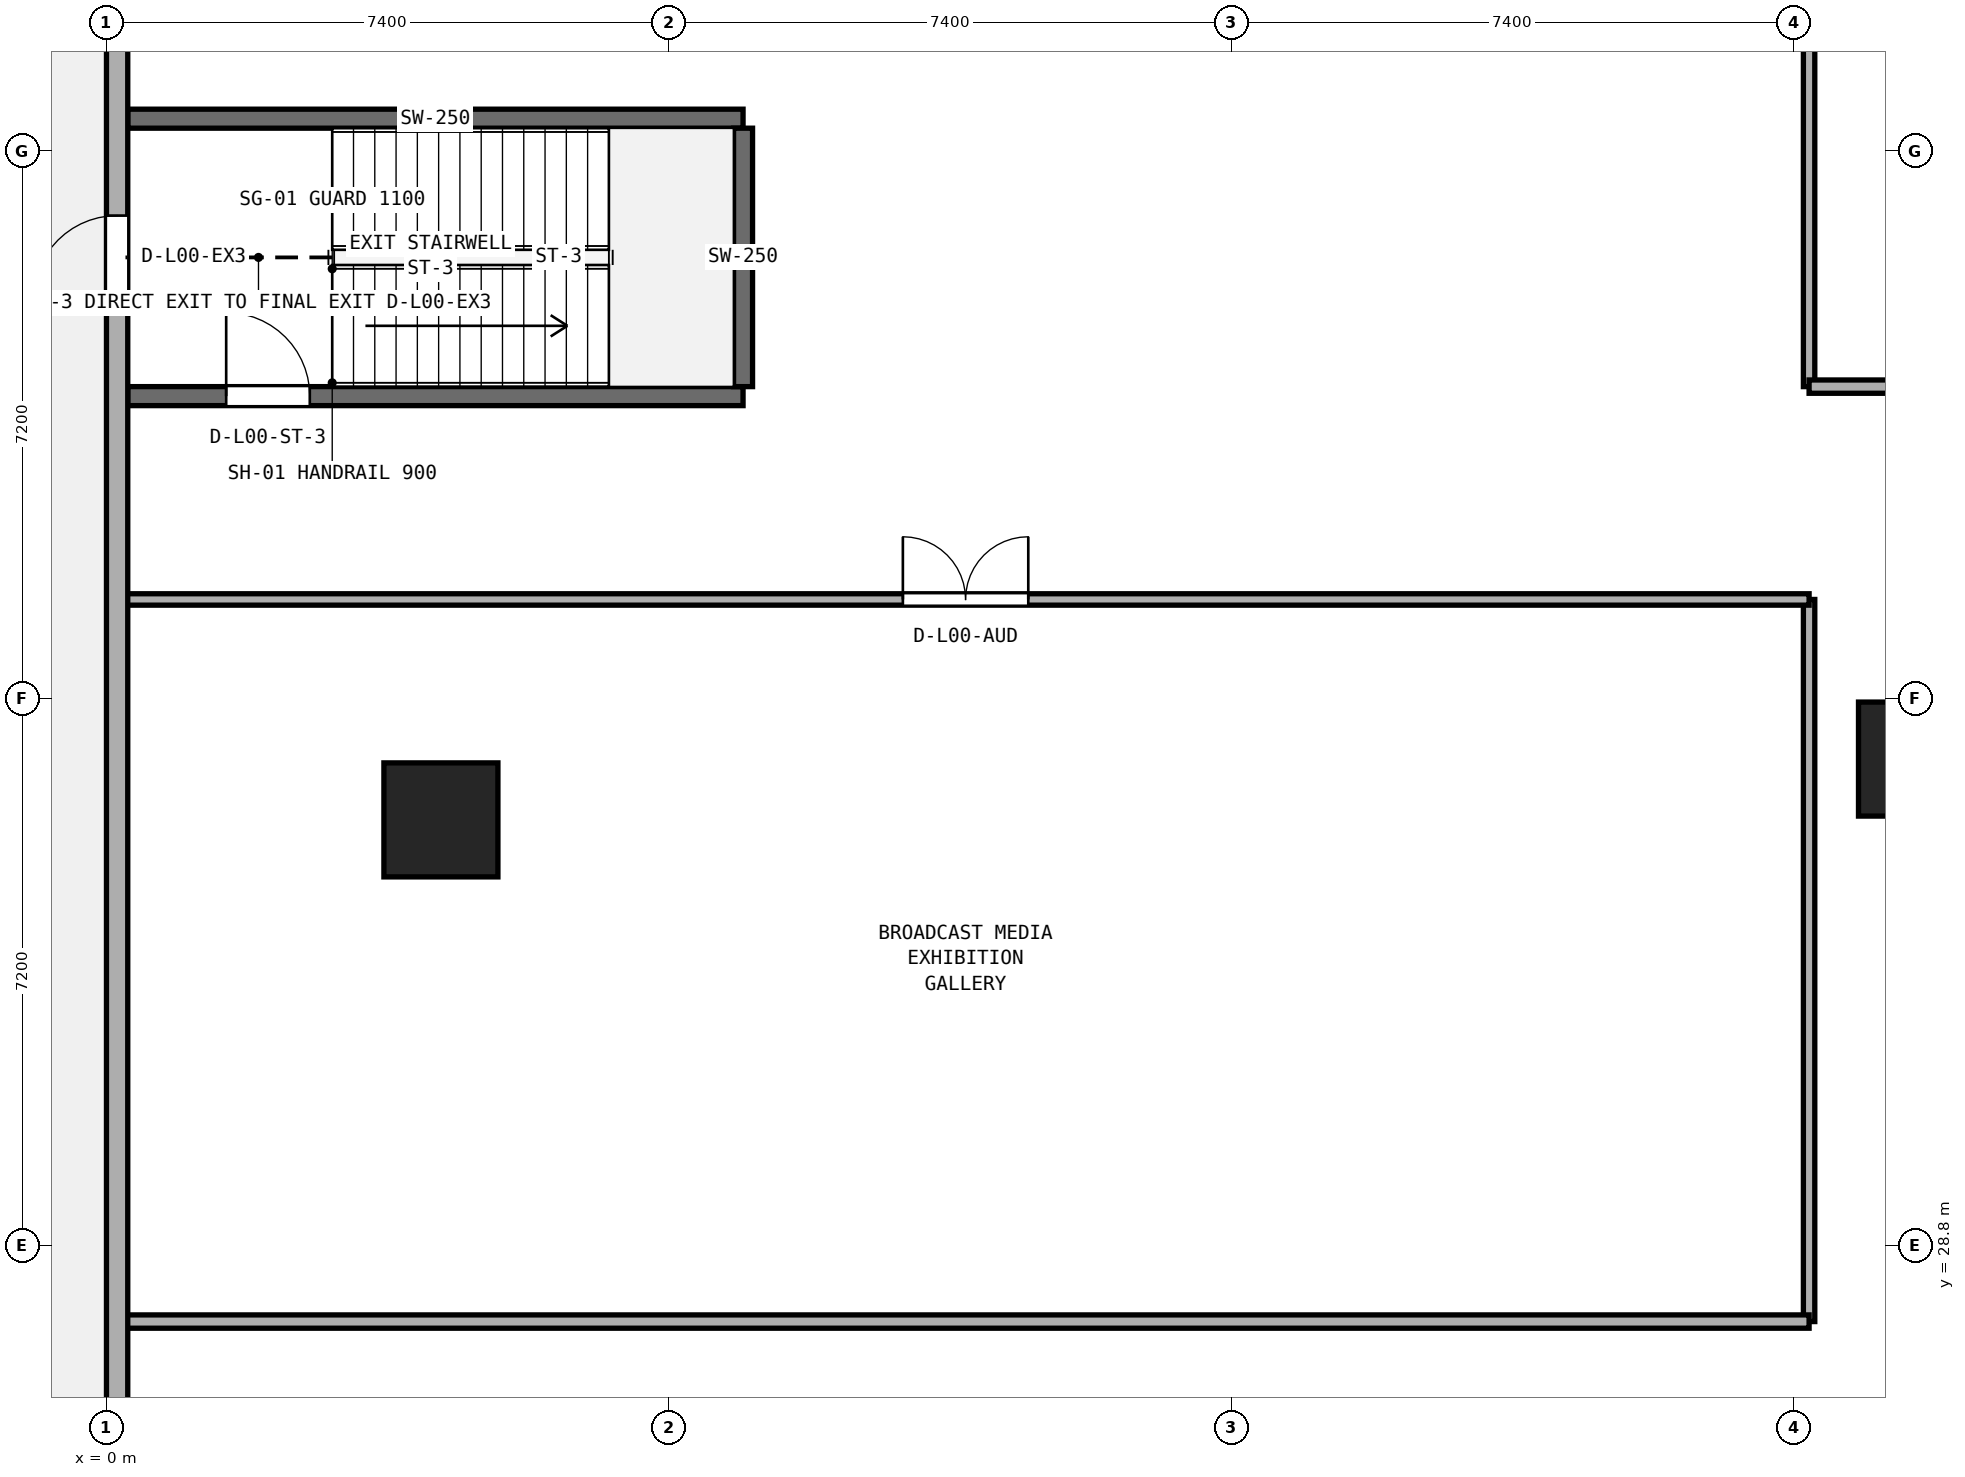
"""IFC4 building model, lengths in metres.
Left out: names, types, materials, properties, quantities, classifications, styles, units other than length and angle.
Written with IfcOpenShell. Run it as: python <this file> out.ifc"""

import sys

from ifc_helpers import new_model, si_unit, direction, frame, frame_2d, origin, origin_2d, place, context, subcontext, project, spatial, rectangle, extrude, element, fill, save


model = new_model("IFC4")
c1 = context("Model", 3, precision=1e-05, world=origin(), true_north=direction((0.0, 1.0)))
c2 = subcontext(c1, "Body", "Model", "MODEL_VIEW")
j1 = project(units=[si_unit("LENGTHUNIT", "METRE"), si_unit("PLANEANGLEUNIT", "RADIAN")], contexts=[c1])
p1 = place(None, origin())
s1 = spatial("IfcSite", under=j1, at=p1, CompositionType="ELEMENT")
p2 = place(p1, origin())
s2 = spatial("IfcBuilding", under=s1, at=p2, CompositionType="ELEMENT")
p3 = place(p2, origin())
s3 = spatial("IfcBuildingStorey", under=s2, at=p3, CompositionType="ELEMENT", Elevation=0.0)
for number, where, z_axis, x_axis in (
    (1, (4.4, 34.4, 0.0), (0.0, 0.0, 1.0), (1.0, 0.0, 0.0)),
    (2, (23.8, 35.2, 0.0), (0.0, 0.0, 1.0), (1.0, 0.0, 0.0)),
):
    element("IfcColumn", number, at=place(p3, frame(where, z_axis=z_axis, x_axis=x_axis)), inside=s3, PredefinedType="COLUMN", context=c2, shape_type="SweptSolid", body=[
        extrude(rectangle(XDim=1.5, YDim=1.5, at=origin_2d()), origin(), (0.0, 0.0, 1.0), 5.0),
    ])
p4 = place(p3, frame((0.28, 39.975, 0.0), z_axis=(0.0, 0.0, 1.0), x_axis=(1.0, 0.0, 0.0)))
e3 = element("IfcWall", 3, at=p4, inside=s3, PredefinedType="SHEAR", context=c2, shape_type="SweptSolid", body=[
    extrude(rectangle(XDim=8.095, YDim=0.25, at=frame_2d((4.047, 0.0))), origin(), (0.0, 0.0, 1.0), 4.66),
])
p5 = place(p4, frame((1.295, 0.0, 0.0)))
e4 = element("IfcOpeningElement", 4, at=p5, cuts=e3, PredefinedType="OPENING", context=c2, shape_type="SweptSolid", body=[
    extrude(rectangle(XDim=1.1, YDim=2.15, at=frame_2d((0.55, 1.075))), frame((0.0, 0.135, 0.0), z_axis=(0.0, -1.0, 0.0), x_axis=(1.0, 0.0, 0.0)), (0.0, 0.0, 1.0), 0.27),
])
p6 = place(p3, frame((0.28, 43.625, 0.0), z_axis=(0.0, 0.0, 1.0), x_axis=(1.0, 0.0, 0.0)))
e5 = element("IfcWall", 5, at=p6, inside=s3, PredefinedType="SHEAR", context=c2, shape_type="SweptSolid", body=[
    extrude(rectangle(XDim=8.095, YDim=0.25, at=frame_2d((4.047, 0.0))), origin(), (0.0, 0.0, 1.0), 4.66),
])
p7 = place(p3, frame((8.375, 40.1, 0.0), z_axis=(0.0, 0.0, 1.0), x_axis=(0.0, 1.0, 0.0)))
e6 = element("IfcWall", 6, at=p7, inside=s3, PredefinedType="SHEAR", context=c2, shape_type="SweptSolid", body=[
    extrude(rectangle(XDim=3.4, YDim=0.25, at=frame_2d((1.7, 0.0))), origin(), (0.0, 0.0, 1.0), 4.66),
])
p8 = place(p3, frame((22.4, 27.8, 0.0), z_axis=(0.0, 0.0, 1.0), x_axis=(0.0, 1.0, 0.0)))
e7 = element("IfcWall", 7, at=p8, inside=s3, PredefinedType="PARTITIONING", context=c2, shape_type="SweptSolid", body=[
    extrude(rectangle(XDim=9.5, YDim=0.15, at=frame_2d((4.75, 0.0))), origin(), (0.0, 0.0, 1.0), 4.66),
])
p9 = place(p3, frame((22.4, 40.1, 0.0), z_axis=(0.0, 0.0, 1.0), x_axis=(0.0, 1.0, 0.0)))
e8 = element("IfcWall", 8, at=p9, inside=s3, PredefinedType="PARTITIONING", context=c2, shape_type="SweptSolid", body=[
    extrude(rectangle(XDim=10.095, YDim=0.15, at=frame_2d((5.047, 0.0))), origin(), (0.0, 0.0, 1.0), 4.66),
])
p10 = place(p3, frame((0.205, 27.8, 0.0), z_axis=(0.0, 0.0, 1.0), x_axis=(1.0, 0.0, 0.0)))
e9 = element("IfcWall", 9, at=p10, inside=s3, PredefinedType="PARTITIONING", context=c2, shape_type="SweptSolid", body=[
    extrude(rectangle(XDim=22.195, YDim=0.175, at=frame_2d((11.097, 0.0))), origin(), (0.0, 0.0, 1.0), 4.66),
])
p11 = place(p3, frame((0.205, 37.3, 0.0), z_axis=(0.0, 0.0, 1.0), x_axis=(1.0, 0.0, 0.0)))
e10 = element("IfcWall", 10, at=p11, inside=s3, PredefinedType="PARTITIONING", context=c2, shape_type="SweptSolid", body=[
    extrude(rectangle(XDim=22.195, YDim=0.15, at=frame_2d((11.097, 0.0))), origin(), (0.0, 0.0, 1.0), 4.66),
])
p12 = place(p11, frame((10.272, 0.0, 0.0)))
e11 = element("IfcOpeningElement", 11, at=p12, cuts=e10, PredefinedType="OPENING", context=c2, shape_type="SweptSolid", body=[
    extrude(rectangle(XDim=1.65, YDim=2.15, at=frame_2d((0.825, 1.075))), frame((0.0, 0.085, 0.0), z_axis=(0.0, -1.0, 0.0), x_axis=(1.0, 0.0, 0.0)), (0.0, 0.0, 1.0), 0.17),
])
p13 = place(p3, frame((22.4, 40.1, 0.0), z_axis=(0.0, 0.0, 1.0), x_axis=(1.0, 0.0, 0.0)))
e12 = element("IfcWall", 12, at=p13, inside=s3, PredefinedType="PARTITIONING", context=c2, shape_type="SweptSolid", body=[
    extrude(rectangle(XDim=29.2, YDim=0.175, at=frame_2d((14.6, 0.0))), origin(), (0.0, 0.0, 1.0), 4.66),
])
p14 = place(p13, frame((14.1, 0.0, 0.0)))
e13 = element("IfcOpeningElement", 13, at=p14, cuts=e12, PredefinedType="OPENING", context=c2, shape_type="SweptSolid", body=[
    extrude(rectangle(XDim=1.0, YDim=2.12, at=frame_2d((0.5, 1.06))), frame((0.0, 0.097, 0.0), z_axis=(0.0, -1.0, 0.0), x_axis=(1.0, 0.0, 0.0)), (0.0, 0.0, 1.0), 0.195),
])
p15 = place(p3, frame((0.14, 4.2, 0.0), z_axis=(0.0, 0.0, 1.0), x_axis=(0.0, 1.0, 0.0)))
e14 = element("IfcWall", 14, at=p15, inside=s3, PredefinedType="STANDARD", context=c2, shape_type="SweptSolid", body=[
    extrude(rectangle(XDim=42.0, YDim=0.28, at=frame_2d((21.0, 0.0))), origin(), (0.0, 0.0, 1.0), 3.76),
])
p16 = place(p15, frame((20.0, 0.0, 0.0)))
e15 = element("IfcOpeningElement", 15, at=p16, cuts=e14, PredefinedType="OPENING", context=c2, shape_type="SweptSolid", body=[
    extrude(rectangle(XDim=2.0, YDim=2.6, at=frame_2d((1.0, 1.3))), frame((0.0, 0.15, 0.0), z_axis=(0.0, -1.0, 0.0), x_axis=(1.0, 0.0, 0.0)), (0.0, 0.0, 1.0), 0.3),
])
p17 = place(p15, frame((37.05, 0.0, 0.0)))
e16 = element("IfcOpeningElement", 16, at=p17, cuts=e14, PredefinedType="OPENING", context=c2, shape_type="SweptSolid", body=[
    extrude(rectangle(XDim=1.1, YDim=2.15, at=frame_2d((0.55, 1.075))), frame((0.0, 0.15, 0.0), z_axis=(0.0, -1.0, 0.0), x_axis=(1.0, 0.0, 0.0)), (0.0, 0.0, 1.0), 0.3),
])
p18 = place(p5, origin())
e17 = element("IfcDoor", 17, at=p18, inside=s3, OperationType="SINGLE_SWING_LEFT", PredefinedType="DOOR", context=c2, shape_type="SweptSolid", body=[
    extrude(rectangle(XDim=1.1, YDim=2.15, at=frame_2d((0.55, 1.075))), frame((0.0, 0.025, 0.0), z_axis=(0.0, -1.0, 0.0), x_axis=(1.0, 0.0, 0.0)), (0.0, 0.0, 1.0), 0.05),
])
fill(e4, e17)
p19 = place(p12, origin())
e18 = element("IfcDoor", 18, at=p19, inside=s3, OperationType="DOUBLE_DOOR_SINGLE_SWING", PredefinedType="DOOR", context=c2, shape_type="SweptSolid", body=[
    extrude(rectangle(XDim=1.65, YDim=2.15, at=frame_2d((0.825, 1.075))), frame((0.0, 0.025, 0.0), z_axis=(0.0, -1.0, 0.0), x_axis=(1.0, 0.0, 0.0)), (0.0, 0.0, 1.0), 0.05),
])
fill(e11, e18)
p20 = place(p17, origin())
e19 = element("IfcDoor", 19, at=p20, inside=s3, OperationType="SINGLE_SWING_LEFT", PredefinedType="DOOR", context=c2, shape_type="SweptSolid", body=[
    extrude(rectangle(XDim=1.1, YDim=2.15, at=frame_2d((0.55, 1.075))), frame((0.0, 0.025, 0.0), z_axis=(0.0, -1.0, 0.0), x_axis=(1.0, 0.0, 0.0)), (0.0, 0.0, 1.0), 0.05),
])
fill(e16, e19)
save(model, sys.argv[1])
